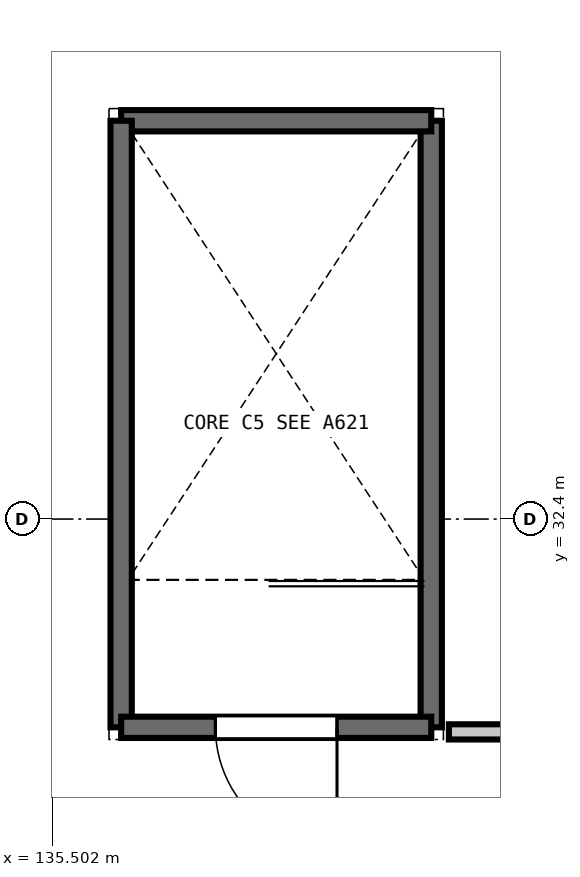
"""IFC4 building model, lengths in metres.
Left out: names, types, materials, properties, quantities, classifications, styles, units other than length and angle.
Written with IfcOpenShell. Run it as: python <this file> out.ifc"""

import sys

from ifc_helpers import new_model, si_unit, direction, frame, frame_2d, origin, place, context, subcontext, project, spatial, rectangle, extrude, element, fill, save


model = new_model("IFC4")
c1 = context("Model", 3, precision=1e-05, world=origin(), true_north=direction((0.0, 1.0)))
c2 = subcontext(c1, "Body", "Model", "MODEL_VIEW")
j1 = project(units=[si_unit("LENGTHUNIT", "METRE"), si_unit("PLANEANGLEUNIT", "RADIAN")], contexts=[c1])
p1 = place(None, origin())
s1 = spatial("IfcSite", under=j1, at=p1, CompositionType="ELEMENT")
p2 = place(p1, origin())
s2 = spatial("IfcBuilding", under=s1, at=p2, CompositionType="ELEMENT")
p3 = place(p2, frame((0.0, 0.0, 16.2)))
s3 = spatial("IfcBuildingStorey", under=s2, at=p3, CompositionType="ELEMENT", Elevation=16.2)
p4 = place(p3, frame((140.49, 29.66, 0.0), z_axis=(0.0, 0.0, 1.0), x_axis=(0.0, 1.0, 0.0)))
e1 = element("IfcWall", 1, at=p4, inside=s3, PredefinedType="SHEAR", context=c2, shape_type="SweptSolid", body=[
    extrude(rectangle(XDim=7.98, YDim=0.28, at=frame_2d((3.99, 0.0))), origin(), (0.0, 0.0, 1.0), 4.2),
])
p5 = place(p3, frame((140.49, 37.64, 0.0), z_axis=(0.0, 0.0, 1.0), x_axis=(-1.0, 0.0, 0.0)))
e2 = element("IfcWall", 2, at=p5, inside=s3, PredefinedType="SHEAR", context=c2, shape_type="SweptSolid", body=[
    extrude(rectangle(XDim=4.08, YDim=0.28, at=frame_2d((2.04, 0.0))), origin(), (0.0, 0.0, 1.0), 4.2),
])
p6 = place(p3, frame((136.41, 37.64, 0.0), z_axis=(0.0, 0.0, 1.0), x_axis=(0.0, -1.0, 0.0)))
e3 = element("IfcWall", 3, at=p6, inside=s3, PredefinedType="SHEAR", context=c2, shape_type="SweptSolid", body=[
    extrude(rectangle(XDim=7.98, YDim=0.28, at=frame_2d((3.99, 0.0))), origin(), (0.0, 0.0, 1.0), 4.2),
])
p7 = place(p3, frame((136.41, 29.66, 0.0), z_axis=(0.0, 0.0, 1.0), x_axis=(1.0, 0.0, 0.0)))
e4 = element("IfcWall", 4, at=p7, inside=s3, PredefinedType="SHEAR", context=c2, shape_type="SweptSolid", body=[
    extrude(rectangle(XDim=4.08, YDim=0.28, at=frame_2d((2.04, 0.0))), origin(), (0.0, 0.0, 1.0), 4.2),
])
p8 = place(p7, frame((1.24, 0.0, 0.0)))
e5 = element("IfcOpeningElement", 5, at=p8, cuts=e4, PredefinedType="OPENING", context=c2, shape_type="SweptSolid", body=[
    extrude(rectangle(XDim=1.6, YDim=2.25, at=frame_2d((0.8, 1.125))), frame((0.0, 0.15, 0.0), z_axis=(0.0, -1.0, 0.0), x_axis=(1.0, 0.0, 0.0)), (0.0, 0.0, 1.0), 0.3),
])
p9 = place(p3, frame((140.722, 29.6, 0.0), z_axis=(0.0, 0.0, 1.0), x_axis=(1.0, 0.0, 0.0)))
e6 = element("IfcWall", 6, at=p9, inside=s3, PredefinedType="PARTITIONING", context=c2, shape_type="SweptSolid", body=[
    extrude(rectangle(XDim=7.478, YDim=0.2, at=frame_2d((3.739, 0.0))), origin(), (0.0, 0.0, 1.0), 3.89),
])
p10 = place(p9, frame((3.089, 0.0, 0.0)))
e7 = element("IfcOpeningElement", 7, at=p10, cuts=e6, PredefinedType="OPENING", context=c2, shape_type="SweptSolid", body=[
    extrude(rectangle(XDim=1.3, YDim=2.2, at=frame_2d((0.65, 1.1))), frame((0.0, 0.11, 0.0), z_axis=(0.0, -1.0, 0.0), x_axis=(1.0, 0.0, 0.0)), (0.0, 0.0, 1.0), 0.22),
])
p11 = place(p8, frame((1.6, 0.0, 0.0), z_axis=(0.0, 0.0, 1.0), x_axis=(-1.0, 0.0, 0.0)))
e8 = element("IfcDoor", 8, at=p11, inside=s3, OperationType="SINGLE_SWING_LEFT", PredefinedType="DOOR", context=c2, shape_type="SweptSolid", body=[
    extrude(rectangle(XDim=1.6, YDim=2.25, at=frame_2d((0.8, 1.125))), frame((0.0, 0.025, 0.0), z_axis=(0.0, -1.0, 0.0), x_axis=(1.0, 0.0, 0.0)), (0.0, 0.0, 1.0), 0.05),
])
fill(e5, e8)
save(model, sys.argv[1])
